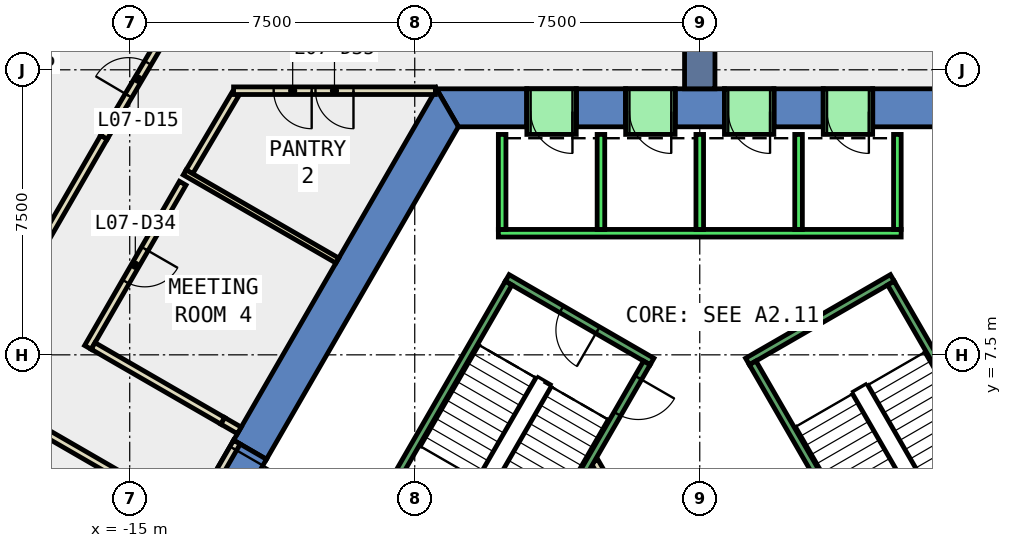
"""IFC4 building model, lengths in metres.
Left out: names, types, materials, properties, quantities, classifications, styles, units other than length and angle.
Written with IfcOpenShell. Run it as: python <this file> out.ifc"""

import sys

from ifc_helpers import new_model, si_unit, direction, frame, frame_2d, origin, place, context, subcontext, project, spatial, polyline, rectangle, outline, extrude, element, fill, save


model = new_model("IFC4")
c1 = context("Model", 3, precision=1e-05, world=origin(), true_north=direction((0.0, 1.0)))
c2 = subcontext(c1, "Body", "Model", "MODEL_VIEW")
j1 = project(units=[si_unit("LENGTHUNIT", "METRE"), si_unit("PLANEANGLEUNIT", "RADIAN")], contexts=[c1])
p1 = place(None, origin())
s1 = spatial("IfcSite", under=j1, at=p1, CompositionType="ELEMENT")
p2 = place(p1, origin())
s2 = spatial("IfcBuilding", under=s1, at=p2, CompositionType="ELEMENT")
p3 = place(p2, frame((0.0, 0.0, 39.2)))
s3 = spatial("IfcBuildingStorey", under=s2, at=p3, CompositionType="ELEMENT", Elevation=39.2)
p4 = place(p3, frame((0.0, 0.0, -0.4)))
e1 = element("IfcWall", 1, at=p4, inside=s3, PredefinedType="SHEAR", context=c2, shape_type="SweptSolid", body=[
    extrude(outline(polyline([(4.55, 14.5), (4.55, 13.5), (6.351, 13.5), (6.928, 14.5), (4.55, 14.5)])), origin(), (0.0, 0.0, 1.0), 4.2),
])
p5 = place(p3, frame((0.0, 0.0, -0.4)))
e2 = element("IfcWall", 2, at=p5, inside=s3, PredefinedType="SHEAR", context=c2, shape_type="SweptSolid", body=[
    extrude(outline(polyline([(1.95, 14.5), (1.95, 13.5), (3.25, 13.5), (3.25, 14.5), (1.95, 14.5)])), origin(), (0.0, 0.0, 1.0), 4.2),
])
p6 = place(p3, frame((0.0, 0.0, -0.4)))
e3 = element("IfcWall", 3, at=p6, inside=s3, PredefinedType="SHEAR", context=c2, shape_type="SweptSolid", body=[
    extrude(outline(polyline([(-0.65, 14.5), (-0.65, 13.5), (0.65, 13.5), (0.65, 14.5), (-0.65, 14.5)])), origin(), (0.0, 0.0, 1.0), 4.2),
])
p7 = place(p3, frame((0.0, 0.0, -0.4)))
e4 = element("IfcWall", 4, at=p7, inside=s3, PredefinedType="SHEAR", context=c2, shape_type="SweptSolid", body=[
    extrude(outline(polyline([(-3.25, 14.5), (-3.25, 13.5), (-1.95, 13.5), (-1.95, 14.5), (-3.25, 14.5)])), origin(), (0.0, 0.0, 1.0), 4.2),
])
p8 = place(p3, frame((0.0, 0.0, -0.4)))
e5 = element("IfcWall", 5, at=p8, inside=s3, PredefinedType="SHEAR", context=c2, shape_type="SweptSolid", body=[
    extrude(outline(polyline([(-4.55, 13.5), (-4.55, 14.5), (-6.928, 14.5), (-6.351, 13.5), (-4.55, 13.5)])), origin(), (0.0, 0.0, 1.0), 4.2),
])
p9 = place(p3, frame((0.0, 0.0, 3.6)))
e6 = element("IfcWall", 6, at=p9, inside=s3, PredefinedType="SHEAR", context=c2, shape_type="SweptSolid", body=[
    extrude(outline(polyline([(3.25, 14.5), (3.25, 13.5), (4.55, 13.5), (4.55, 14.5), (3.25, 14.5)])), origin(), (0.0, 0.0, 1.0), 0.2),
])
p10 = place(p3, frame((0.0, 0.0, 3.6)))
e7 = element("IfcWall", 7, at=p10, inside=s3, PredefinedType="SHEAR", context=c2, shape_type="SweptSolid", body=[
    extrude(outline(polyline([(0.65, 14.5), (0.65, 13.5), (1.95, 13.5), (1.95, 14.5), (0.65, 14.5)])), origin(), (0.0, 0.0, 1.0), 0.2),
])
p11 = place(p3, frame((0.0, 0.0, 3.6)))
e8 = element("IfcWall", 8, at=p11, inside=s3, PredefinedType="SHEAR", context=c2, shape_type="SweptSolid", body=[
    extrude(outline(polyline([(-1.95, 14.5), (-1.95, 13.5), (-0.65, 13.5), (-0.65, 14.5), (-1.95, 14.5)])), origin(), (0.0, 0.0, 1.0), 0.2),
])
p12 = place(p3, frame((0.0, 0.0, 3.6)))
e9 = element("IfcWall", 9, at=p12, inside=s3, PredefinedType="SHEAR", context=c2, shape_type="SweptSolid", body=[
    extrude(outline(polyline([(-4.55, 14.5), (-4.55, 13.5), (-3.25, 13.5), (-3.25, 14.5), (-4.55, 14.5)])), origin(), (0.0, 0.0, 1.0), 0.2),
])
p13 = place(p3, frame((0.0, 0.0, -0.4)))
e10 = element("IfcWall", 10, at=p13, inside=s3, PredefinedType="SHEAR", context=c2, shape_type="SweptSolid", body=[
    extrude(outline(polyline([(-12.267, 5.252), (-11.402, 4.752), (-6.351, 13.5), (-6.928, 14.5), (-12.267, 5.252)])), origin(), (0.0, 0.0, 1.0), 4.2),
])
p14 = place(p3, frame((0.0, 0.0, 3.6)))
e11 = element("IfcWall", 11, at=p14, inside=s3, PredefinedType="SHEAR", context=c2, shape_type="SweptSolid", body=[
    extrude(outline(polyline([(-13.267, 3.52), (-12.402, 3.02), (-11.402, 4.752), (-12.267, 5.252), (-13.267, 3.52)])), origin(), (0.0, 0.0, 1.0), 0.2),
])
p15 = place(p3, frame((0.0, 14.5, -0.4), z_axis=(0.0, 0.0, 1.0), x_axis=(0.0, 1.0, 0.0)))
e12 = element("IfcWall", 12, at=p15, inside=s3, PredefinedType="SHEAR", context=c2, shape_type="SweptSolid", body=[
    extrude(rectangle(XDim=9.0, YDim=0.8, at=frame_2d((4.5, 0.0))), origin(), (0.0, 0.0, 1.0), 4.2),
])
p16 = place(p3, frame((-13.606, 12.016, 0.0), z_axis=(0.0, 0.0, 1.0), x_axis=(-0.499992180995, -0.866029918042, 0.0)))
e13 = element("IfcWall", 13, at=p16, inside=s3, PredefinedType="PARTITIONING", context=c2, shape_type="SweptSolid", body=[
    extrude(rectangle(XDim=4.988, YDim=0.2, at=frame_2d((2.494, 0.0))), origin(), (0.0, 0.0, 1.0), 3.8),
])
p17 = place(p16, frame((1.994, 0.0, 0.0)))
e14 = element("IfcOpeningElement", 14, at=p17, cuts=e13, PredefinedType="OPENING", context=c2, shape_type="SweptSolid", body=[
    extrude(rectangle(XDim=1.0, YDim=2.1, at=frame_2d((0.5, 1.05))), frame((0.0, 0.11, 0.0), z_axis=(0.0, -1.0, 0.0), x_axis=(1.0, 0.0, 0.0)), (0.0, 0.0, 1.0), 0.22),
])
p18 = place(p3, frame((-15.963, 7.733, 0.0), z_axis=(0.0, 0.0, 1.0), x_axis=(0.865965832374, -0.500103166518, 0.0)))
e15 = element("IfcWall", 15, at=p18, inside=s3, PredefinedType="PARTITIONING", context=c2, shape_type="SweptSolid", body=[
    extrude(rectangle(XDim=3.941, YDim=0.2, at=frame_2d((1.971, 0.0))), origin(), (0.0, 0.0, 1.0), 3.8),
])
p19 = place(p3, frame((-12.218, 14.364, 0.0), z_axis=(0.0, 0.0, 1.0), x_axis=(-0.508767325294, -0.860904064756, 0.0)))
e16 = element("IfcWall", 16, at=p19, inside=s3, PredefinedType="PARTITIONING", context=c2, shape_type="SweptSolid", body=[
    extrude(rectangle(XDim=2.38, YDim=0.2, at=frame_2d((1.19, 0.0))), origin(), (0.0, 0.0, 1.0), 3.8),
])
p20 = place(p3, frame((-17.261, 5.48, 0.0), z_axis=(0.0, 0.0, 1.0), x_axis=(0.865949187497, -0.500131987253, 0.0)))
e17 = element("IfcWall", 17, at=p20, inside=s3, PredefinedType="PARTITIONING", context=c2, shape_type="SweptSolid", body=[
    extrude(rectangle(XDim=3.939, YDim=0.2, at=frame_2d((1.969, 0.0))), origin(), (0.0, 0.0, 1.0), 3.8),
])
p21 = place(p3, frame((-17.448, 10.16, 0.0), z_axis=(0.0, 0.0, 1.0), x_axis=(0.499951278228, 0.866053531485, 0.0)))
e18 = element("IfcWall", 18, at=p21, inside=s3, PredefinedType="PARTITIONING", context=c2, shape_type="SweptSolid", body=[
    extrude(rectangle(XDim=3.54, YDim=0.2, at=frame_2d((1.77, 0.0))), origin(), (0.0, 0.0, 1.0), 3.8),
])
p22 = place(p3, frame((-15.678, 13.226, 0.0), z_axis=(0.0, 0.0, 1.0), x_axis=(0.508613166028, 0.860995149431, 0.0)))
e19 = element("IfcWall", 19, at=p22, inside=s3, PredefinedType="PARTITIONING", context=c2, shape_type="SweptSolid", body=[
    extrude(rectangle(XDim=3.541, YDim=0.2, at=frame_2d((1.771, 0.0))), origin(), (0.0, 0.0, 1.0), 3.8),
])
p23 = place(p22, frame((1.271, 0.0, 0.0)))
e20 = element("IfcOpeningElement", 20, at=p23, cuts=e19, PredefinedType="OPENING", context=c2, shape_type="SweptSolid", body=[
    extrude(rectangle(XDim=1.0, YDim=2.1, at=frame_2d((0.5, 1.05))), frame((0.0, 0.11, 0.0), z_axis=(0.0, -1.0, 0.0), x_axis=(1.0, 0.0, 0.0)), (0.0, 0.0, 1.0), 0.22),
])
p24 = place(p3, frame((-13.554, 12.3, 0.0), z_axis=(0.0, 0.0, 1.0), x_axis=(0.866028685375, -0.499994316075, 0.0)))
e21 = element("IfcWall", 21, at=p24, inside=s3, PredefinedType="PARTITIONING", context=c2, shape_type="SweptSolid", body=[
    extrude(rectangle(XDim=4.638, YDim=0.15, at=frame_2d((2.319, 0.0))), origin(), (0.0, 0.0, 1.0), 3.8),
])
p25 = place(p3, frame((-6.957, 14.45, 0.0), z_axis=(0.0, 0.0, 1.0), x_axis=(-1.0, 0.0, 0.0)))
e22 = element("IfcWall", 22, at=p25, inside=s3, PredefinedType="PARTITIONING", context=c2, shape_type="SweptSolid", body=[
    extrude(rectangle(XDim=5.31, YDim=0.2, at=frame_2d((2.655, 0.0))), origin(), (0.0, 0.0, 1.0), 3.8),
])
p26 = place(p25, frame((2.155, 0.0, 0.0)))
e23 = element("IfcOpeningElement", 23, at=p26, cuts=e22, PredefinedType="OPENING", context=c2, shape_type="SweptSolid", body=[
    extrude(rectangle(XDim=1.0, YDim=2.1, at=frame_2d((0.5, 1.05))), frame((0.0, 0.11, 0.0), z_axis=(0.0, -1.0, 0.0), x_axis=(1.0, 0.0, 0.0)), (0.0, 0.0, 1.0), 0.22),
])
p27 = place(p25, frame((3.255, 0.0, 0.0)))
e24 = element("IfcOpeningElement", 24, at=p27, cuts=e22, PredefinedType="OPENING", context=c2, shape_type="SweptSolid", body=[
    extrude(rectangle(XDim=1.0, YDim=2.1, at=frame_2d((0.5, 1.05))), frame((0.0, 0.11, 0.0), z_axis=(0.0, -1.0, 0.0), x_axis=(1.0, 0.0, 0.0)), (0.0, 0.0, 1.0), 0.22),
])
p28 = place(p3, frame((-2.771, 4.7, 0.0), z_axis=(0.0, 0.0, 1.0), x_axis=(0.499969479948, -0.866043023828, 0.0)))
e25 = element("IfcWall", 25, at=p28, inside=s3, PredefinedType="PARTITIONING", context=c2, shape_type="SweptSolid", body=[
    extrude(rectangle(XDim=4.99, YDim=0.2, at=frame_2d((2.495, 0.0))), origin(), (0.0, 0.0, 1.0), 3.8),
])
p29 = place(p28, frame((1.945, 0.0, 0.0)))
e26 = element("IfcOpeningElement", 26, at=p29, cuts=e25, PredefinedType="OPENING", context=c2, shape_type="SweptSolid", body=[
    extrude(rectangle(XDim=1.0, YDim=2.1, at=frame_2d((0.5, 1.05))), frame((0.0, 0.11, 0.0), z_axis=(0.0, -1.0, 0.0), x_axis=(1.0, 0.0, 0.0)), (0.0, 0.0, 1.0), 0.22),
])
p30 = place(p3, frame((-12.18, 5.202, 0.0), z_axis=(0.0, 0.0, 1.0), x_axis=(-0.50002537861, -0.866010750942, 0.0)))
e27 = element("IfcWall", 27, at=p30, inside=s3, PredefinedType="PARTITIONING", context=c2, shape_type="SweptSolid", body=[
    extrude(rectangle(XDim=2.0, YDim=0.2, at=frame_2d((1.0, 0.0))), origin(), (0.0, 0.0, 1.0), 2.4),
])
p31 = place(p30, frame((0.19, 0.0, 0.0)))
e28 = element("IfcOpeningElement", 28, at=p31, cuts=e27, PredefinedType="OPENING", context=c2, shape_type="SweptSolid", body=[
    extrude(rectangle(XDim=1.8, YDim=2.1, at=frame_2d((0.9, 1.05))), frame((0.0, 0.11, 0.0), z_axis=(0.0, -1.0, 0.0), x_axis=(1.0, 0.0, 0.0)), (0.0, 0.0, 1.0), 0.22),
])
p32 = place(p3, frame((-12.55, 5.762, 0.0), z_axis=(0.0, 0.0, 1.0), x_axis=(0.866071776036, -0.499919672301, 0.0)))
e29 = element("IfcWall", 29, at=p32, inside=s3, PredefinedType="PARTITIONING", context=c2, shape_type="SweptSolid", body=[
    extrude(rectangle(XDim=0.5, YDim=0.2, at=frame_2d((0.25, 0.0))), origin(), (0.0, 0.0, 1.0), 2.4),
])
p33 = place(p3, frame((5.3, 10.7, 0.0), z_axis=(0.0, 0.0, 1.0), x_axis=(-1.0, 0.0, 0.0)))
e30 = element("IfcWall", 30, at=p33, inside=s3, PredefinedType="STANDARD", context=c2, shape_type="SweptSolid", body=[
    extrude(rectangle(XDim=10.6, YDim=0.2, at=frame_2d((5.3, 0.0))), origin(), (0.0, 0.0, 1.0), 3.8),
])
for number, where, z_axis, x_axis in (
    (31, (5.2, 10.8, 0.0), (0.0, 0.0, 1.0), (0.0, 1.0, 0.0)),
    (32, (2.6, 10.8, 0.0), (0.0, 0.0, 1.0), (0.0, 1.0, 0.0)),
    (33, (0.0, 10.8, 0.0), (0.0, 0.0, 1.0), (0.0, 1.0, 0.0)),
    (34, (-2.6, 10.8, 0.0), (0.0, 0.0, 1.0), (0.0, 1.0, 0.0)),
    (35, (-5.2, 10.8, 0.0), (0.0, 0.0, 1.0), (0.0, 1.0, 0.0)),
):
    element("IfcWall", number, at=place(p3, frame(where, z_axis=z_axis, x_axis=x_axis)), inside=s3, PredefinedType="STANDARD", context=c2, shape_type="SweptSolid", body=[
        extrude(rectangle(XDim=2.5, YDim=0.2, at=frame_2d((1.25, 0.0))), origin(), (0.0, 0.0, 1.0), 3.8),
    ])
p34 = place(p3, frame((4.55, 13.9, 0.0), z_axis=(0.0, 0.0, 1.0), x_axis=(-1.0, 0.0, 0.0)))
e36 = element("IfcWall", 36, at=p34, inside=s3, PredefinedType="STANDARD", context=c2, shape_type="SweptSolid", body=[
    extrude(rectangle(XDim=1.3, YDim=1.2, at=frame_2d((0.65, 0.0))), origin(), (0.0, 0.0, 1.0), 2.4),
])
p35 = place(p34, frame((0.1, 0.0, 0.0)))
e37 = element("IfcOpeningElement", 37, at=p35, cuts=e36, PredefinedType="OPENING", context=c2, shape_type="SweptSolid", body=[
    extrude(rectangle(XDim=1.1, YDim=2.3, at=frame_2d((0.55, 1.15))), frame((0.0, 0.61, 0.0), z_axis=(0.0, -1.0, 0.0), x_axis=(1.0, 0.0, 0.0)), (0.0, 0.0, 1.0), 1.22),
])
p36 = place(p3, frame((1.95, 13.9, 0.0), z_axis=(0.0, 0.0, 1.0), x_axis=(-1.0, 0.0, 0.0)))
e38 = element("IfcWall", 38, at=p36, inside=s3, PredefinedType="STANDARD", context=c2, shape_type="SweptSolid", body=[
    extrude(rectangle(XDim=1.3, YDim=1.2, at=frame_2d((0.65, 0.0))), origin(), (0.0, 0.0, 1.0), 2.4),
])
p37 = place(p36, frame((0.1, 0.0, 0.0)))
e39 = element("IfcOpeningElement", 39, at=p37, cuts=e38, PredefinedType="OPENING", context=c2, shape_type="SweptSolid", body=[
    extrude(rectangle(XDim=1.1, YDim=2.3, at=frame_2d((0.55, 1.15))), frame((0.0, 0.61, 0.0), z_axis=(0.0, -1.0, 0.0), x_axis=(1.0, 0.0, 0.0)), (0.0, 0.0, 1.0), 1.22),
])
p38 = place(p3, frame((-0.65, 13.9, 0.0), z_axis=(0.0, 0.0, 1.0), x_axis=(-1.0, 0.0, 0.0)))
e40 = element("IfcWall", 40, at=p38, inside=s3, PredefinedType="STANDARD", context=c2, shape_type="SweptSolid", body=[
    extrude(rectangle(XDim=1.3, YDim=1.2, at=frame_2d((0.65, 0.0))), origin(), (0.0, 0.0, 1.0), 2.4),
])
p39 = place(p38, frame((0.1, 0.0, 0.0)))
e41 = element("IfcOpeningElement", 41, at=p39, cuts=e40, PredefinedType="OPENING", context=c2, shape_type="SweptSolid", body=[
    extrude(rectangle(XDim=1.1, YDim=2.3, at=frame_2d((0.55, 1.15))), frame((0.0, 0.61, 0.0), z_axis=(0.0, -1.0, 0.0), x_axis=(1.0, 0.0, 0.0)), (0.0, 0.0, 1.0), 1.22),
])
p40 = place(p3, frame((-3.25, 13.9, 0.0), z_axis=(0.0, 0.0, 1.0), x_axis=(-1.0, 0.0, 0.0)))
e42 = element("IfcWall", 42, at=p40, inside=s3, PredefinedType="STANDARD", context=c2, shape_type="SweptSolid", body=[
    extrude(rectangle(XDim=1.3, YDim=1.2, at=frame_2d((0.65, 0.0))), origin(), (0.0, 0.0, 1.0), 2.4),
])
p41 = place(p40, frame((0.1, 0.0, 0.0)))
e43 = element("IfcOpeningElement", 43, at=p41, cuts=e42, PredefinedType="OPENING", context=c2, shape_type="SweptSolid", body=[
    extrude(rectangle(XDim=1.1, YDim=2.3, at=frame_2d((0.55, 1.15))), frame((0.0, 0.61, 0.0), z_axis=(0.0, -1.0, 0.0), x_axis=(1.0, 0.0, 0.0)), (0.0, 0.0, 1.0), 1.22),
])
p42 = place(p3, frame((1.256, 7.324, 0.0), z_axis=(0.0, 0.0, 1.0), x_axis=(0.866046073146, 0.499964197906, 0.0)))
e44 = element("IfcWall", 44, at=p42, inside=s3, PredefinedType="STANDARD", context=c2, shape_type="SweptSolid", body=[
    extrude(rectangle(XDim=4.4, YDim=0.2, at=frame_2d((2.2, 0.0))), origin(), (0.0, 0.0, 1.0), 3.8),
])
p43 = place(p3, frame((4.843, 1.312, 0.0), z_axis=(0.0, 0.0, 1.0), x_axis=(-0.499963383562, 0.866046543262, 0.0)))
e45 = element("IfcWall", 45, at=p43, inside=s3, PredefinedType="STANDARD", context=c2, shape_type="SweptSolid", body=[
    extrude(rectangle(XDim=6.9, YDim=0.2, at=frame_2d((3.45, 0.0))), origin(), (0.0, 0.0, 1.0), 3.8),
])
p44 = place(p43, frame((0.45, 0.0, 0.0)))
e46 = element("IfcOpeningElement", 46, at=p44, cuts=e45, PredefinedType="OPENING", context=c2, shape_type="SweptSolid", body=[
    extrude(rectangle(XDim=1.1, YDim=2.2, at=frame_2d((0.55, 1.1))), frame((0.0, 0.11, 0.0), z_axis=(0.0, -1.0, 0.0), x_axis=(1.0, 0.0, 0.0)), (0.0, 0.0, 1.0), 0.22),
])
p45 = place(p3, frame((8.48, 3.412, 0.0), z_axis=(0.0, 0.0, 1.0), x_axis=(-0.499978703459, 0.866037698999, 0.0)))
e47 = element("IfcWall", 47, at=p45, inside=s3, PredefinedType="STANDARD", context=c2, shape_type="SweptSolid", body=[
    extrude(rectangle(XDim=6.9, YDim=0.2, at=frame_2d((3.45, 0.0))), origin(), (0.0, 0.0, 1.0), 3.8),
])
p46 = place(p3, frame((-1.256, 7.324, 0.0), z_axis=(0.0, 0.0, 1.0), x_axis=(-0.866046073146, 0.499964197906, 0.0)))
e48 = element("IfcWall", 48, at=p46, inside=s3, PredefinedType="STANDARD", context=c2, shape_type="SweptSolid", body=[
    extrude(rectangle(XDim=4.4, YDim=0.2, at=frame_2d((2.2, 0.0))), origin(), (0.0, 0.0, 1.0), 3.8),
])
p47 = place(p46, frame((1.65, 0.0, 0.0)))
e49 = element("IfcOpeningElement", 49, at=p47, cuts=e48, PredefinedType="OPENING", context=c2, shape_type="SweptSolid", body=[
    extrude(rectangle(XDim=1.1, YDim=2.2, at=frame_2d((0.55, 1.1))), frame((0.0, 0.11, 0.0), z_axis=(0.0, -1.0, 0.0), x_axis=(1.0, 0.0, 0.0)), (0.0, 0.0, 1.0), 0.22),
])
p48 = place(p3, frame((-1.393, 7.288, 0.0), z_axis=(0.0, 0.0, 1.0), x_axis=(-0.499963383562, -0.866046543262, 0.0)))
e50 = element("IfcWall", 50, at=p48, inside=s3, PredefinedType="STANDARD", context=c2, shape_type="SweptSolid", body=[
    extrude(rectangle(XDim=6.9, YDim=0.2, at=frame_2d((3.45, 0.0))), origin(), (0.0, 0.0, 1.0), 3.8),
])
p49 = place(p48, frame((0.45, 0.0, 0.0)))
e51 = element("IfcOpeningElement", 51, at=p49, cuts=e50, PredefinedType="OPENING", context=c2, shape_type="SweptSolid", body=[
    extrude(rectangle(XDim=1.1, YDim=2.2, at=frame_2d((0.55, 1.1))), frame((0.0, 0.11, 0.0), z_axis=(0.0, -1.0, 0.0), x_axis=(1.0, 0.0, 0.0)), (0.0, 0.0, 1.0), 0.22),
])
p50 = place(p3, frame((-5.03, 9.388, 0.0), z_axis=(0.0, 0.0, 1.0), x_axis=(-0.499978703459, -0.866037698999, 0.0)))
e52 = element("IfcWall", 52, at=p50, inside=s3, PredefinedType="STANDARD", context=c2, shape_type="SweptSolid", body=[
    extrude(rectangle(XDim=6.9, YDim=0.2, at=frame_2d((3.45, 0.0))), origin(), (0.0, 0.0, 1.0), 3.8),
])
p51 = place(p23, origin())
e53 = element("IfcDoor", 53, at=p51, inside=s3, OperationType="SINGLE_SWING_LEFT", PredefinedType="DOOR", context=c2, shape_type="SweptSolid", body=[
    extrude(rectangle(XDim=1.0, YDim=2.1, at=frame_2d((0.5, 1.05))), frame((0.0, 0.025, 0.0), z_axis=(0.0, -1.0, 0.0), x_axis=(1.0, 0.0, 0.0)), (0.0, 0.0, 1.0), 0.05),
])
fill(e20, e53)
p52 = place(p17, origin())
e54 = element("IfcDoor", 54, at=p52, inside=s3, OperationType="SINGLE_SWING_LEFT", PredefinedType="DOOR", context=c2, shape_type="SweptSolid", body=[
    extrude(rectangle(XDim=1.0, YDim=2.1, at=frame_2d((0.5, 1.05))), frame((0.0, 0.025, 0.0), z_axis=(0.0, -1.0, 0.0), x_axis=(1.0, 0.0, 0.0)), (0.0, 0.0, 1.0), 0.05),
])
fill(e14, e54)
p53 = place(p26, origin())
e55 = element("IfcDoor", 55, at=p53, inside=s3, OperationType="SINGLE_SWING_LEFT", PredefinedType="DOOR", context=c2, shape_type="SweptSolid", body=[
    extrude(rectangle(XDim=1.0, YDim=2.1, at=frame_2d((0.5, 1.05))), frame((0.0, 0.025, 0.0), z_axis=(0.0, -1.0, 0.0), x_axis=(1.0, 0.0, 0.0)), (0.0, 0.0, 1.0), 0.05),
])
fill(e23, e55)
p54 = place(p27, origin())
e56 = element("IfcDoor", 56, at=p54, inside=s3, OperationType="SINGLE_SWING_RIGHT", PredefinedType="DOOR", context=c2, shape_type="SweptSolid", body=[
    extrude(rectangle(XDim=1.0, YDim=2.1, at=frame_2d((0.5, 1.05))), frame((0.0, 0.025, 0.0), z_axis=(0.0, -1.0, 0.0), x_axis=(1.0, 0.0, 0.0)), (0.0, 0.0, 1.0), 0.05),
])
fill(e24, e56)
p55 = place(p31, origin())
e57 = element("IfcDoor", 57, at=p55, inside=s3, OperationType="DOUBLE_DOOR_SINGLE_SWING", PredefinedType="DOOR", context=c2, shape_type="SweptSolid", body=[
    extrude(rectangle(XDim=1.8, YDim=2.1, at=frame_2d((0.9, 1.05))), frame((0.0, 0.025, 0.0), z_axis=(0.0, -1.0, 0.0), x_axis=(1.0, 0.0, 0.0)), (0.0, 0.0, 1.0), 0.05),
])
fill(e28, e57)
p56 = place(p35, origin())
e58 = element("IfcDoor", 58, at=p56, inside=s3, OperationType="SLIDING_TO_LEFT", PredefinedType="DOOR", context=c2, shape_type="SweptSolid", body=[
    extrude(rectangle(XDim=1.1, YDim=2.3, at=frame_2d((0.55, 1.15))), frame((0.0, 0.025, 0.0), z_axis=(0.0, -1.0, 0.0), x_axis=(1.0, 0.0, 0.0)), (0.0, 0.0, 1.0), 0.05),
])
fill(e37, e58)
p57 = place(p37, origin())
e59 = element("IfcDoor", 59, at=p57, inside=s3, OperationType="SLIDING_TO_LEFT", PredefinedType="DOOR", context=c2, shape_type="SweptSolid", body=[
    extrude(rectangle(XDim=1.1, YDim=2.3, at=frame_2d((0.55, 1.15))), frame((0.0, 0.025, 0.0), z_axis=(0.0, -1.0, 0.0), x_axis=(1.0, 0.0, 0.0)), (0.0, 0.0, 1.0), 0.05),
])
fill(e39, e59)
p58 = place(p39, origin())
e60 = element("IfcDoor", 60, at=p58, inside=s3, OperationType="SLIDING_TO_LEFT", PredefinedType="DOOR", context=c2, shape_type="SweptSolid", body=[
    extrude(rectangle(XDim=1.1, YDim=2.3, at=frame_2d((0.55, 1.15))), frame((0.0, 0.025, 0.0), z_axis=(0.0, -1.0, 0.0), x_axis=(1.0, 0.0, 0.0)), (0.0, 0.0, 1.0), 0.05),
])
fill(e41, e60)
p59 = place(p41, origin())
e61 = element("IfcDoor", 61, at=p59, inside=s3, OperationType="SLIDING_TO_LEFT", PredefinedType="DOOR", context=c2, shape_type="SweptSolid", body=[
    extrude(rectangle(XDim=1.1, YDim=2.3, at=frame_2d((0.55, 1.15))), frame((0.0, 0.025, 0.0), z_axis=(0.0, -1.0, 0.0), x_axis=(1.0, 0.0, 0.0)), (0.0, 0.0, 1.0), 0.05),
])
fill(e43, e61)
p60 = place(p49, origin())
e62 = element("IfcDoor", 62, at=p60, inside=s3, OperationType="SINGLE_SWING_LEFT", PredefinedType="DOOR", context=c2, shape_type="SweptSolid", body=[
    extrude(rectangle(XDim=1.1, YDim=2.2, at=frame_2d((0.55, 1.1))), frame((0.0, 0.025, 0.0), z_axis=(0.0, -1.0, 0.0), x_axis=(1.0, 0.0, 0.0)), (0.0, 0.0, 1.0), 0.05),
])
fill(e51, e62)
p61 = place(p47, origin())
e63 = element("IfcDoor", 63, at=p61, inside=s3, OperationType="SINGLE_SWING_LEFT", PredefinedType="DOOR", context=c2, shape_type="SweptSolid", body=[
    extrude(rectangle(XDim=1.1, YDim=2.2, at=frame_2d((0.55, 1.1))), frame((0.0, 0.025, 0.0), z_axis=(0.0, -1.0, 0.0), x_axis=(1.0, 0.0, 0.0)), (0.0, 0.0, 1.0), 0.05),
])
fill(e49, e63)
save(model, sys.argv[1])
